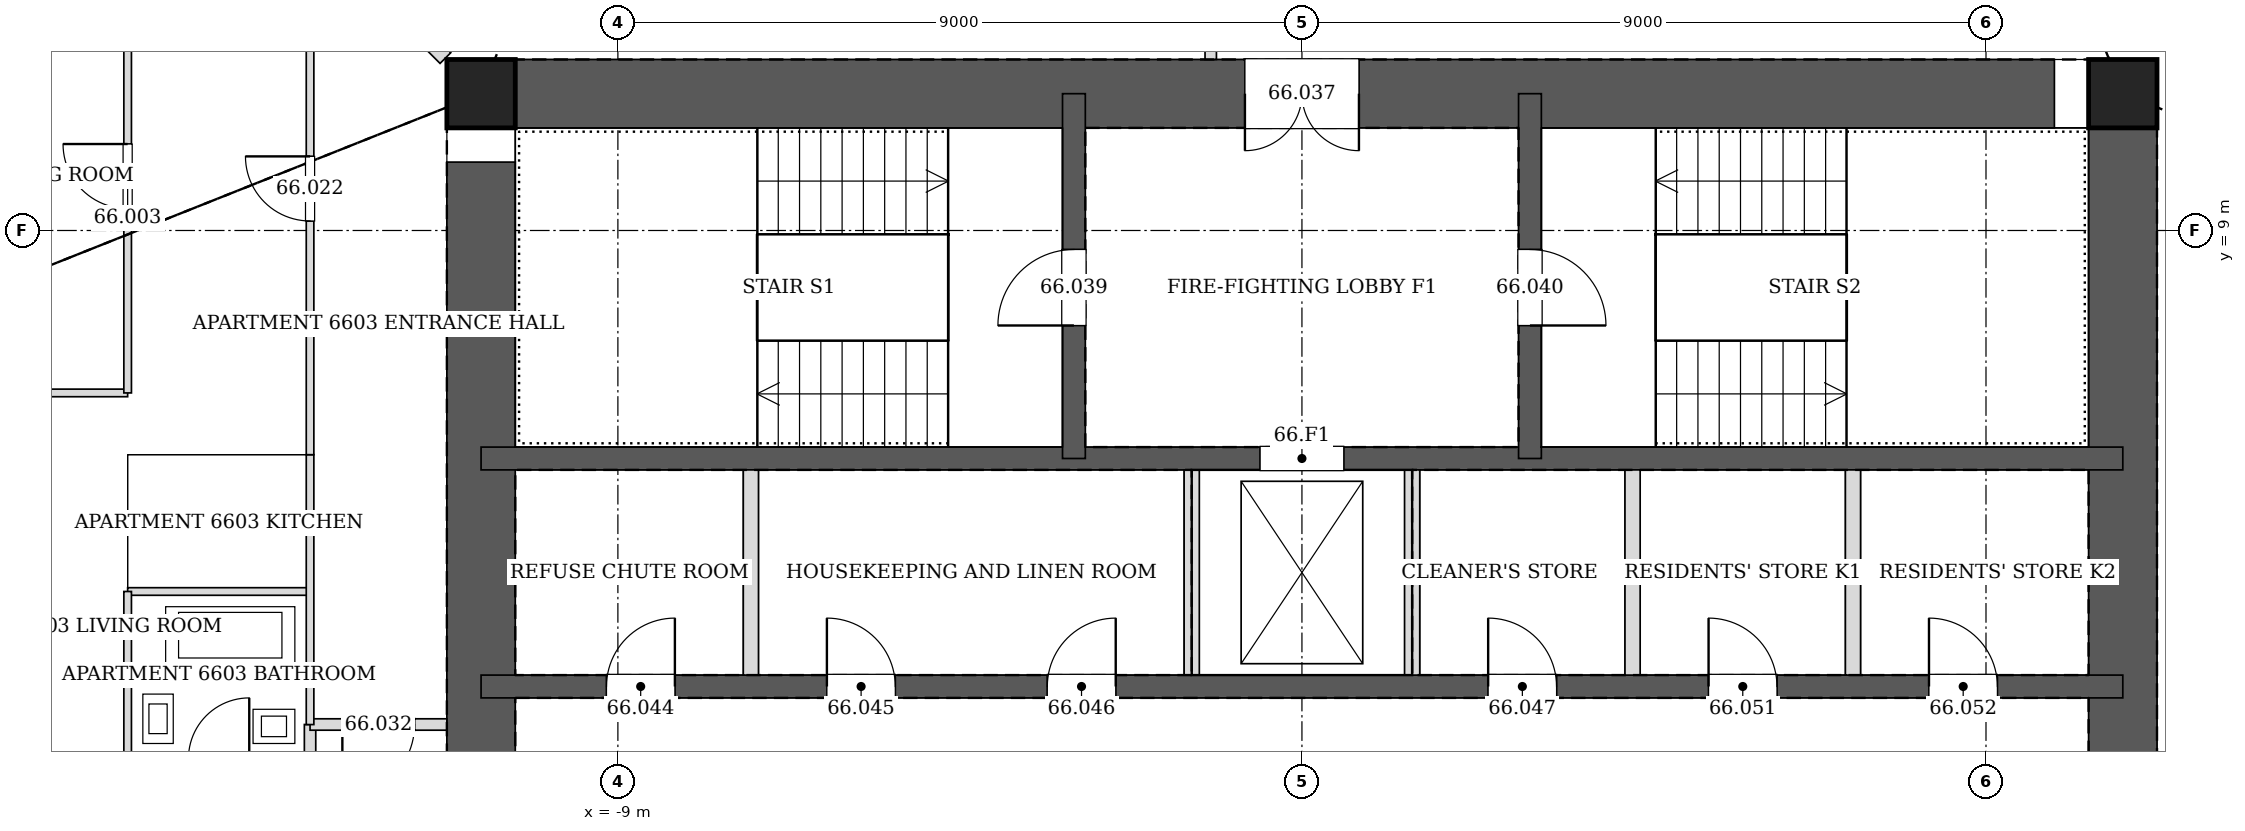
"""IFC4 building model, lengths in metres.
Left out: names, types, materials, properties, quantities, classifications, styles, units other than length and angle.
Written with IfcOpenShell. Run it as: python <this file> out.ifc"""

import sys

from ifc_helpers import new_model, si_unit, direction, frame, frame_2d, origin, origin_2d, place, context, subcontext, project, spatial, rectangle, hollow_rectangle, extrude, element, fill, save


model = new_model("IFC4")
c1 = context("Model", 3, precision=1e-05, world=origin(), true_north=direction((0.0, 1.0)))
c2 = subcontext(c1, "Body", "Model", "MODEL_VIEW")
j1 = project(units=[si_unit("LENGTHUNIT", "METRE"), si_unit("PLANEANGLEUNIT", "RADIAN")], contexts=[c1])
p1 = place(None, origin())
s1 = spatial("IfcSite", under=j1, at=p1, CompositionType="ELEMENT")
p2 = place(p1, origin())
s2 = spatial("IfcBuilding", under=s1, at=p2, CompositionType="ELEMENT")
p3 = place(p2, frame((0.0, 0.0, 274.2)))
s3 = spatial("IfcBuildingStorey", under=s2, at=p3, CompositionType="ELEMENT", Elevation=274.2)
for number, where, z_axis, x_axis in (
    (1, (10.8, 10.8, 0.0), (0.0, 0.0, 1.0), (1.0, 0.0, 0.0)),
    (2, (-10.8, 10.8, 0.0), (0.0, 0.0, 1.0), (1.0, 0.0, 0.0)),
):
    element("IfcColumn", number, at=place(p3, frame(where, z_axis=z_axis, x_axis=x_axis)), inside=s3, PredefinedType="COLUMN", context=c2, shape_type="SweptSolid", body=[
        extrude(hollow_rectangle(XDim=0.9, YDim=0.9, WallThickness=0.04, at=origin_2d()), origin(), (0.0, 0.0, 1.0), 3.4),
    ])
p4 = place(p3, frame((10.8, -10.8, 0.0), z_axis=(0.0, 0.0, 1.0), x_axis=(0.0, 1.0, 0.0)))
e3 = element("IfcWall", 3, at=p4, inside=s3, PredefinedType="SOLIDWALL", context=c2, shape_type="SweptSolid", body=[
    extrude(rectangle(XDim=21.6, YDim=0.9, at=frame_2d((10.8, 0.0))), origin(), (0.0, 0.0, 1.0), 3.4),
])
p5 = place(p4, frame((11.7, 0.0, 0.0)))
e4 = element("IfcOpeningElement", 4, at=p5, cuts=e3, PredefinedType="OPENING", context=c2, shape_type="SweptSolid", body=[
    extrude(rectangle(XDim=1.2, YDim=2.1, at=frame_2d((0.6, 1.05))), frame((0.0, 0.46, 0.0), z_axis=(0.0, -1.0, 0.0), x_axis=(1.0, 0.0, 0.0)), (0.0, 0.0, 1.0), 0.92),
])
p6 = place(p4, frame((8.7, 0.0, 0.0)))
e5 = element("IfcOpeningElement", 5, at=p6, cuts=e3, PredefinedType="OPENING", context=c2, shape_type="SweptSolid", body=[
    extrude(rectangle(XDim=1.2, YDim=2.1, at=frame_2d((0.6, 1.05))), frame((0.0, 0.46, 0.0), z_axis=(0.0, -1.0, 0.0), x_axis=(1.0, 0.0, 0.0)), (0.0, 0.0, 1.0), 0.92),
])
p7 = place(p3, frame((10.8, 10.8, 0.0), z_axis=(0.0, 0.0, 1.0), x_axis=(-1.0, 0.0, 0.0)))
e6 = element("IfcWall", 6, at=p7, inside=s3, PredefinedType="SOLIDWALL", context=c2, shape_type="SweptSolid", body=[
    extrude(rectangle(XDim=21.6, YDim=0.9, at=frame_2d((10.8, 0.0))), origin(), (0.0, 0.0, 1.0), 3.4),
])
p8 = place(p7, frame((10.05, 0.0, 0.0)))
e7 = element("IfcOpeningElement", 7, at=p8, cuts=e6, PredefinedType="OPENING", context=c2, shape_type="SweptSolid", body=[
    extrude(rectangle(XDim=1.5, YDim=2.1, at=frame_2d((0.75, 1.05))), frame((0.0, 0.46, 0.0), z_axis=(0.0, -1.0, 0.0), x_axis=(1.0, 0.0, 0.0)), (0.0, 0.0, 1.0), 0.92),
])
p9 = place(p3, frame((-10.8, 10.8, 0.0), z_axis=(0.0, 0.0, 1.0), x_axis=(0.0, -1.0, 0.0)))
e8 = element("IfcWall", 8, at=p9, inside=s3, PredefinedType="SOLIDWALL", context=c2, shape_type="SweptSolid", body=[
    extrude(rectangle(XDim=21.6, YDim=0.9, at=frame_2d((10.8, 0.0))), origin(), (0.0, 0.0, 1.0), 3.4),
])
p10 = place(p9, frame((8.7, 0.0, 0.0)))
e9 = element("IfcOpeningElement", 9, at=p10, cuts=e8, PredefinedType="OPENING", context=c2, shape_type="SweptSolid", body=[
    extrude(rectangle(XDim=1.2, YDim=2.1, at=frame_2d((0.6, 1.05))), frame((0.0, 0.46, 0.0), z_axis=(0.0, -1.0, 0.0), x_axis=(1.0, 0.0, 0.0)), (0.0, 0.0, 1.0), 0.92),
])
p11 = place(p9, frame((11.7, 0.0, 0.0)))
e10 = element("IfcOpeningElement", 10, at=p11, cuts=e8, PredefinedType="OPENING", context=c2, shape_type="SweptSolid", body=[
    extrude(rectangle(XDim=1.2, YDim=2.1, at=frame_2d((0.6, 1.05))), frame((0.0, 0.46, 0.0), z_axis=(0.0, -1.0, 0.0), x_axis=(1.0, 0.0, 0.0)), (0.0, 0.0, 1.0), 0.92),
])
p12 = place(p3, frame((-10.8, 3.0, 0.0), z_axis=(0.0, 0.0, 1.0), x_axis=(1.0, 0.0, 0.0)))
e11 = element("IfcWall", 11, at=p12, inside=s3, PredefinedType="SOLIDWALL", context=c2, shape_type="SweptSolid", body=[
    extrude(rectangle(XDim=21.6, YDim=0.3, at=frame_2d((10.8, 0.0))), origin(), (0.0, 0.0, 1.0), 3.4),
])
p13 = place(p12, frame((1.65, 0.0, 0.0)))
e12 = element("IfcOpeningElement", 12, at=p13, cuts=e11, PredefinedType="OPENING", context=c2, shape_type="SweptSolid", body=[
    extrude(rectangle(XDim=0.9, YDim=2.1, at=frame_2d((0.45, 1.05))), frame((0.0, 0.16, 0.0), z_axis=(0.0, -1.0, 0.0), x_axis=(1.0, 0.0, 0.0)), (0.0, 0.0, 1.0), 0.32),
])
p14 = place(p12, frame((4.55, 0.0, 0.0)))
e13 = element("IfcOpeningElement", 13, at=p14, cuts=e11, PredefinedType="OPENING", context=c2, shape_type="SweptSolid", body=[
    extrude(rectangle(XDim=0.9, YDim=2.1, at=frame_2d((0.45, 1.05))), frame((0.0, 0.16, 0.0), z_axis=(0.0, -1.0, 0.0), x_axis=(1.0, 0.0, 0.0)), (0.0, 0.0, 1.0), 0.32),
])
p15 = place(p12, frame((7.45, 0.0, 0.0)))
e14 = element("IfcOpeningElement", 14, at=p15, cuts=e11, PredefinedType="OPENING", context=c2, shape_type="SweptSolid", body=[
    extrude(rectangle(XDim=0.9, YDim=2.1, at=frame_2d((0.45, 1.05))), frame((0.0, 0.16, 0.0), z_axis=(0.0, -1.0, 0.0), x_axis=(1.0, 0.0, 0.0)), (0.0, 0.0, 1.0), 0.32),
])
p16 = place(p12, frame((13.25, 0.0, 0.0)))
e15 = element("IfcOpeningElement", 15, at=p16, cuts=e11, PredefinedType="OPENING", context=c2, shape_type="SweptSolid", body=[
    extrude(rectangle(XDim=0.9, YDim=2.1, at=frame_2d((0.45, 1.05))), frame((0.0, 0.16, 0.0), z_axis=(0.0, -1.0, 0.0), x_axis=(1.0, 0.0, 0.0)), (0.0, 0.0, 1.0), 0.32),
])
p17 = place(p12, frame((16.15, 0.0, 0.0)))
e16 = element("IfcOpeningElement", 16, at=p17, cuts=e11, PredefinedType="OPENING", context=c2, shape_type="SweptSolid", body=[
    extrude(rectangle(XDim=0.9, YDim=2.1, at=frame_2d((0.45, 1.05))), frame((0.0, 0.16, 0.0), z_axis=(0.0, -1.0, 0.0), x_axis=(1.0, 0.0, 0.0)), (0.0, 0.0, 1.0), 0.32),
])
p18 = place(p12, frame((19.05, 0.0, 0.0)))
e17 = element("IfcOpeningElement", 17, at=p18, cuts=e11, PredefinedType="OPENING", context=c2, shape_type="SweptSolid", body=[
    extrude(rectangle(XDim=0.9, YDim=2.1, at=frame_2d((0.45, 1.05))), frame((0.0, 0.16, 0.0), z_axis=(0.0, -1.0, 0.0), x_axis=(1.0, 0.0, 0.0)), (0.0, 0.0, 1.0), 0.32),
])
p19 = place(p3, frame((-10.8, 6.0, 0.0), z_axis=(0.0, 0.0, 1.0), x_axis=(1.0, 0.0, 0.0)))
e18 = element("IfcWall", 18, at=p19, inside=s3, PredefinedType="SOLIDWALL", context=c2, shape_type="SweptSolid", body=[
    extrude(rectangle(XDim=21.6, YDim=0.3, at=frame_2d((10.8, 0.0))), origin(), (0.0, 0.0, 1.0), 3.4),
])
p20 = place(p19, frame((10.25, 0.0, 0.0)))
e19 = element("IfcOpeningElement", 19, at=p20, cuts=e18, PredefinedType="OPENING", context=c2, shape_type="SweptSolid", body=[
    extrude(rectangle(XDim=1.1, YDim=2.1, at=frame_2d((0.55, 1.05))), frame((0.0, 0.16, 0.0), z_axis=(0.0, -1.0, 0.0), x_axis=(1.0, 0.0, 0.0)), (0.0, 0.0, 1.0), 0.32),
])
p21 = place(p3, frame((-3.0, 6.0, 0.0), z_axis=(0.0, 0.0, 1.0), x_axis=(0.0, 1.0, 0.0)))
e20 = element("IfcWall", 20, at=p21, inside=s3, PredefinedType="SOLIDWALL", context=c2, shape_type="SweptSolid", body=[
    extrude(rectangle(XDim=4.8, YDim=0.3, at=frame_2d((2.4, 0.0))), origin(), (0.0, 0.0, 1.0), 3.4),
])
p22 = place(p21, frame((1.75, 0.0, 0.0)))
e21 = element("IfcOpeningElement", 21, at=p22, cuts=e20, PredefinedType="OPENING", context=c2, shape_type="SweptSolid", body=[
    extrude(rectangle(XDim=1.0, YDim=2.1, at=frame_2d((0.5, 1.05))), frame((0.0, 0.16, 0.0), z_axis=(0.0, -1.0, 0.0), x_axis=(1.0, 0.0, 0.0)), (0.0, 0.0, 1.0), 0.32),
])
p23 = place(p3, frame((3.0, 6.0, 0.0), z_axis=(0.0, 0.0, 1.0), x_axis=(0.0, 1.0, 0.0)))
e22 = element("IfcWall", 22, at=p23, inside=s3, PredefinedType="SOLIDWALL", context=c2, shape_type="SweptSolid", body=[
    extrude(rectangle(XDim=4.8, YDim=0.3, at=frame_2d((2.4, 0.0))), origin(), (0.0, 0.0, 1.0), 3.4),
])
p24 = place(p23, frame((1.75, 0.0, 0.0)))
e23 = element("IfcOpeningElement", 23, at=p24, cuts=e22, PredefinedType="OPENING", context=c2, shape_type="SweptSolid", body=[
    extrude(rectangle(XDim=1.0, YDim=2.1, at=frame_2d((0.5, 1.05))), frame((0.0, 0.16, 0.0), z_axis=(0.0, -1.0, 0.0), x_axis=(1.0, 0.0, 0.0)), (0.0, 0.0, 1.0), 0.32),
])
p25 = place(p3, frame((-1.2, 13.05, 0.0), z_axis=(0.0, 0.0, 1.0), x_axis=(0.0, -1.0, 0.0)))
e24 = element("IfcWall", 24, at=p25, inside=s3, PredefinedType="PARTITIONING", context=c2, shape_type="SweptSolid", body=[
    extrude(rectangle(XDim=1.8, YDim=0.15, at=frame_2d((0.9, 0.0))), origin(), (0.0, 0.0, 1.0), 3.2),
])
p26 = place(p25, frame((0.425, 0.0, 0.0)))
e25 = element("IfcOpeningElement", 25, at=p26, cuts=e24, PredefinedType="OPENING", context=c2, shape_type="SweptSolid", body=[
    extrude(rectangle(XDim=0.95, YDim=2.1, at=frame_2d((0.475, 1.05))), frame((0.0, 0.085, 0.0), z_axis=(0.0, -1.0, 0.0), x_axis=(1.0, 0.0, 0.0)), (0.0, 0.0, 1.0), 0.17),
])
p27 = place(p3, frame((-13.05, 2.5, 0.0), z_axis=(0.0, 0.0, 1.0), x_axis=(0.0, -1.0, 0.0)))
e26 = element("IfcWall", 26, at=p27, inside=s3, PredefinedType="PARTITIONING", context=c2, shape_type="SweptSolid", body=[
    extrude(rectangle(XDim=0.451, YDim=0.15, at=frame_2d((0.226, 0.0))), origin(), (0.0, 0.0, 1.0), 3.2),
])
p28 = place(p3, frame((-11.25, 2.5, 0.0), z_axis=(0.0, 0.0, 1.0), x_axis=(-1.0, 0.0, 0.0)))
e27 = element("IfcWall", 27, at=p28, inside=s3, PredefinedType="PARTITIONING", context=c2, shape_type="SweptSolid", body=[
    extrude(rectangle(XDim=1.8, YDim=0.15, at=frame_2d((0.9, 0.0))), origin(), (0.0, 0.0, 1.0), 3.2),
])
p29 = place(p28, frame((0.425, 0.0, 0.0)))
e28 = element("IfcOpeningElement", 28, at=p29, cuts=e27, PredefinedType="OPENING", context=c2, shape_type="SweptSolid", body=[
    extrude(rectangle(XDim=0.95, YDim=2.1, at=frame_2d((0.475, 1.05))), frame((0.0, 0.085, 0.0), z_axis=(0.0, -1.0, 0.0), x_axis=(1.0, 0.0, 0.0)), (0.0, 0.0, 1.0), 0.17),
])
p30 = place(p3, frame((-18.142, 6.863, 0.0), z_axis=(0.0, 0.0, 1.0), x_axis=(1.0, 0.0, 0.0)))
e29 = element("IfcWall", 29, at=p30, inside=s3, PredefinedType="PARTITIONING", context=c2, shape_type="SweptSolid", body=[
    extrude(rectangle(XDim=2.692, YDim=0.1, at=frame_2d((1.346, 0.0))), origin(), (0.0, 0.0, 1.0), 2.591),
])
p31 = place(p3, frame((-15.45, 6.863, 0.0), z_axis=(0.0, 0.0, 1.0), x_axis=(0.0, 1.0, 0.0)))
e30 = element("IfcWall", 30, at=p31, inside=s3, PredefinedType="PARTITIONING", context=c2, shape_type="SweptSolid", body=[
    extrude(rectangle(XDim=6.314, YDim=0.1, at=frame_2d((3.157, 0.0))), origin(), (0.0, 0.0, 1.0), 2.428),
])
p32 = place(p31, frame((2.425, 0.0, 0.0)))
e31 = element("IfcOpeningElement", 31, at=p32, cuts=e30, PredefinedType="OPENING", context=c2, shape_type="SweptSolid", body=[
    extrude(rectangle(XDim=0.85, YDim=2.1, at=frame_2d((0.425, 1.05))), frame((0.0, 0.06, 0.0), z_axis=(0.0, -1.0, 0.0), x_axis=(1.0, 0.0, 0.0)), (0.0, 0.0, 1.0), 0.12),
])
p33 = place(p3, frame((-13.518, 13.518, 0.0), z_axis=(0.0, 0.0, 1.0), x_axis=(0.707106781187, -0.707106781187, 0.0)))
e32 = element("IfcWall", 32, at=p33, inside=s3, PredefinedType="PARTITIONING", context=c2, shape_type="SweptSolid", body=[
    extrude(rectangle(XDim=3.181, YDim=0.2, at=frame_2d((1.59, 0.0))), origin(), (0.0, 0.0, 1.0), 2.591),
])
p34 = place(p3, frame((-15.45, 4.25, 0.0), z_axis=(0.0, 0.0, 1.0), x_axis=(1.0, 0.0, 0.0)))
e33 = element("IfcWall", 33, at=p34, inside=s3, PredefinedType="PARTITIONING", context=c2, shape_type="SweptSolid", body=[
    extrude(rectangle(XDim=2.4, YDim=0.1, at=frame_2d((1.2, 0.0))), origin(), (0.0, 0.0, 1.0), 2.591),
])
p35 = place(p3, frame((-13.05, 6.05, 0.0), z_axis=(0.0, 0.0, 1.0), x_axis=(0.0, -1.0, 0.0)))
e34 = element("IfcWall", 34, at=p35, inside=s3, PredefinedType="PARTITIONING", context=c2, shape_type="SweptSolid", body=[
    extrude(rectangle(XDim=3.551, YDim=0.1, at=frame_2d((1.775, 0.0))), origin(), (0.0, 0.0, 1.0), 3.2),
])
p36 = place(p3, frame((-15.45, 4.25, 0.0), z_axis=(0.0, 0.0, 1.0), x_axis=(0.0, -1.0, 0.0)))
e35 = element("IfcWall", 35, at=p36, inside=s3, PredefinedType="PARTITIONING", context=c2, shape_type="SweptSolid", body=[
    extrude(rectangle(XDim=2.2, YDim=0.1, at=frame_2d((1.1, 0.0))), origin(), (0.0, 0.0, 1.0), 3.2),
])
p37 = place(p3, frame((-13.05, 6.05, 0.0), z_axis=(0.0, 0.0, 1.0), x_axis=(0.0, 1.0, 0.0)))
e36 = element("IfcWall", 36, at=p37, inside=s3, PredefinedType="PARTITIONING", context=c2, shape_type="SweptSolid", body=[
    extrude(rectangle(XDim=7.0, YDim=0.1, at=frame_2d((3.5, 0.0))), origin(), (0.0, 0.0, 1.0), 2.428),
])
p38 = place(p37, frame((3.075, 0.0, 0.0)))
e37 = element("IfcOpeningElement", 37, at=p38, cuts=e36, PredefinedType="OPENING", context=c2, shape_type="SweptSolid", body=[
    extrude(rectangle(XDim=0.85, YDim=2.1, at=frame_2d((0.425, 1.05))), frame((0.0, 0.06, 0.0), z_axis=(0.0, -1.0, 0.0), x_axis=(1.0, 0.0, 0.0)), (0.0, 0.0, 1.0), 0.12),
])
for number, where, z_axis, x_axis in (
    (38, (-7.25, 3.15, 0.0), (0.0, 0.0, 1.0), (0.0, 1.0, 0.0)),
    (39, (-1.45, 3.15, 0.0), (0.0, 0.0, 1.0), (0.0, 1.0, 0.0)),
    (40, (1.45, 3.15, 0.0), (0.0, 0.0, 1.0), (0.0, 1.0, 0.0)),
    (41, (4.35, 3.15, 0.0), (0.0, 0.0, 1.0), (0.0, 1.0, 0.0)),
    (42, (7.25, 3.15, 0.0), (0.0, 0.0, 1.0), (0.0, 1.0, 0.0)),
):
    element("IfcWall", number, at=place(p3, frame(where, z_axis=z_axis, x_axis=x_axis)), inside=s3, PredefinedType="PARTITIONING", context=c2, shape_type="SweptSolid", body=[
        extrude(rectangle(XDim=2.7, YDim=0.2, at=frame_2d((1.35, 0.0))), origin(), (0.0, 0.0, 1.0), 3.2),
    ])
p39 = place(p32, origin())
e43 = element("IfcDoor", 43, at=p39, inside=s3, OperationType="SINGLE_SWING_RIGHT", PredefinedType="DOOR", context=c2, shape_type="SweptSolid", body=[
    extrude(rectangle(XDim=0.85, YDim=2.1, at=frame_2d((0.425, 1.05))), frame((0.0, 0.025, 0.0), z_axis=(0.0, -1.0, 0.0), x_axis=(1.0, 0.0, 0.0)), (0.0, 0.0, 1.0), 0.05),
])
fill(e31, e43)
p40 = place(p38, origin())
e44 = element("IfcDoor", 44, at=p40, inside=s3, OperationType="SINGLE_SWING_RIGHT", PredefinedType="DOOR", context=c2, shape_type="SweptSolid", body=[
    extrude(rectangle(XDim=0.85, YDim=2.1, at=frame_2d((0.425, 1.05))), frame((0.0, 0.025, 0.0), z_axis=(0.0, -1.0, 0.0), x_axis=(1.0, 0.0, 0.0)), (0.0, 0.0, 1.0), 0.05),
])
fill(e37, e44)
p41 = place(p29, origin())
e45 = element("IfcDoor", 45, at=p41, inside=s3, OperationType="SINGLE_SWING_RIGHT", PredefinedType="DOOR", context=c2, shape_type="SweptSolid", body=[
    extrude(rectangle(XDim=0.95, YDim=2.1, at=frame_2d((0.475, 1.05))), frame((0.0, 0.025, 0.0), z_axis=(0.0, -1.0, 0.0), x_axis=(1.0, 0.0, 0.0)), (0.0, 0.0, 1.0), 0.05),
])
fill(e28, e45)
p42 = place(p8, origin())
e46 = element("IfcDoor", 46, at=p42, inside=s3, OperationType="DOUBLE_DOOR_SINGLE_SWING", PredefinedType="DOOR", context=c2, shape_type="SweptSolid", body=[
    extrude(rectangle(XDim=1.5, YDim=2.1, at=frame_2d((0.75, 1.05))), frame((0.0, 0.025, 0.0), z_axis=(0.0, -1.0, 0.0), x_axis=(1.0, 0.0, 0.0)), (0.0, 0.0, 1.0), 0.05),
])
fill(e7, e46)
p43 = place(p22, origin())
e47 = element("IfcDoor", 47, at=p43, inside=s3, OperationType="SINGLE_SWING_LEFT", PredefinedType="DOOR", context=c2, shape_type="SweptSolid", body=[
    extrude(rectangle(XDim=1.0, YDim=2.1, at=frame_2d((0.5, 1.05))), frame((0.0, 0.025, 0.0), z_axis=(0.0, -1.0, 0.0), x_axis=(1.0, 0.0, 0.0)), (0.0, 0.0, 1.0), 0.05),
])
fill(e21, e47)
p44 = place(p24, frame((1.0, 0.0, 0.0), z_axis=(0.0, 0.0, 1.0), x_axis=(-1.0, 0.0, 0.0)))
e48 = element("IfcDoor", 48, at=p44, inside=s3, OperationType="SINGLE_SWING_RIGHT", PredefinedType="DOOR", context=c2, shape_type="SweptSolid", body=[
    extrude(rectangle(XDim=1.0, YDim=2.1, at=frame_2d((0.5, 1.05))), frame((0.0, 0.025, 0.0), z_axis=(0.0, -1.0, 0.0), x_axis=(1.0, 0.0, 0.0)), (0.0, 0.0, 1.0), 0.05),
])
fill(e23, e48)
p45 = place(p13, origin())
e49 = element("IfcDoor", 49, at=p45, inside=s3, OperationType="SINGLE_SWING_RIGHT", PredefinedType="DOOR", context=c2, shape_type="SweptSolid", body=[
    extrude(rectangle(XDim=0.9, YDim=2.1, at=frame_2d((0.45, 1.05))), frame((0.0, 0.025, 0.0), z_axis=(0.0, -1.0, 0.0), x_axis=(1.0, 0.0, 0.0)), (0.0, 0.0, 1.0), 0.05),
])
fill(e12, e49)
p46 = place(p14, origin())
e50 = element("IfcDoor", 50, at=p46, inside=s3, OperationType="SINGLE_SWING_LEFT", PredefinedType="DOOR", context=c2, shape_type="SweptSolid", body=[
    extrude(rectangle(XDim=0.9, YDim=2.1, at=frame_2d((0.45, 1.05))), frame((0.0, 0.025, 0.0), z_axis=(0.0, -1.0, 0.0), x_axis=(1.0, 0.0, 0.0)), (0.0, 0.0, 1.0), 0.05),
])
fill(e13, e50)
p47 = place(p15, origin())
e51 = element("IfcDoor", 51, at=p47, inside=s3, OperationType="SINGLE_SWING_RIGHT", PredefinedType="DOOR", context=c2, shape_type="SweptSolid", body=[
    extrude(rectangle(XDim=0.9, YDim=2.1, at=frame_2d((0.45, 1.05))), frame((0.0, 0.025, 0.0), z_axis=(0.0, -1.0, 0.0), x_axis=(1.0, 0.0, 0.0)), (0.0, 0.0, 1.0), 0.05),
])
fill(e14, e51)
p48 = place(p16, origin())
e52 = element("IfcDoor", 52, at=p48, inside=s3, OperationType="SINGLE_SWING_LEFT", PredefinedType="DOOR", context=c2, shape_type="SweptSolid", body=[
    extrude(rectangle(XDim=0.9, YDim=2.1, at=frame_2d((0.45, 1.05))), frame((0.0, 0.025, 0.0), z_axis=(0.0, -1.0, 0.0), x_axis=(1.0, 0.0, 0.0)), (0.0, 0.0, 1.0), 0.05),
])
fill(e15, e52)
p49 = place(p17, origin())
e53 = element("IfcDoor", 53, at=p49, inside=s3, OperationType="SINGLE_SWING_LEFT", PredefinedType="DOOR", context=c2, shape_type="SweptSolid", body=[
    extrude(rectangle(XDim=0.9, YDim=2.1, at=frame_2d((0.45, 1.05))), frame((0.0, 0.025, 0.0), z_axis=(0.0, -1.0, 0.0), x_axis=(1.0, 0.0, 0.0)), (0.0, 0.0, 1.0), 0.05),
])
fill(e16, e53)
p50 = place(p18, origin())
e54 = element("IfcDoor", 54, at=p50, inside=s3, OperationType="SINGLE_SWING_LEFT", PredefinedType="DOOR", context=c2, shape_type="SweptSolid", body=[
    extrude(rectangle(XDim=0.9, YDim=2.1, at=frame_2d((0.45, 1.05))), frame((0.0, 0.025, 0.0), z_axis=(0.0, -1.0, 0.0), x_axis=(1.0, 0.0, 0.0)), (0.0, 0.0, 1.0), 0.05),
])
fill(e17, e54)
p51 = place(p20, origin())
e55 = element("IfcDoor", 55, at=p51, inside=s3, OperationType="DOUBLE_DOOR_SLIDING", PredefinedType="DOOR", context=c2, shape_type="SweptSolid", body=[
    extrude(rectangle(XDim=1.1, YDim=2.1, at=frame_2d((0.55, 1.05))), frame((0.0, 0.025, 0.0), z_axis=(0.0, -1.0, 0.0), x_axis=(1.0, 0.0, 0.0)), (0.0, 0.0, 1.0), 0.05),
])
fill(e19, e55)
save(model, sys.argv[1])
